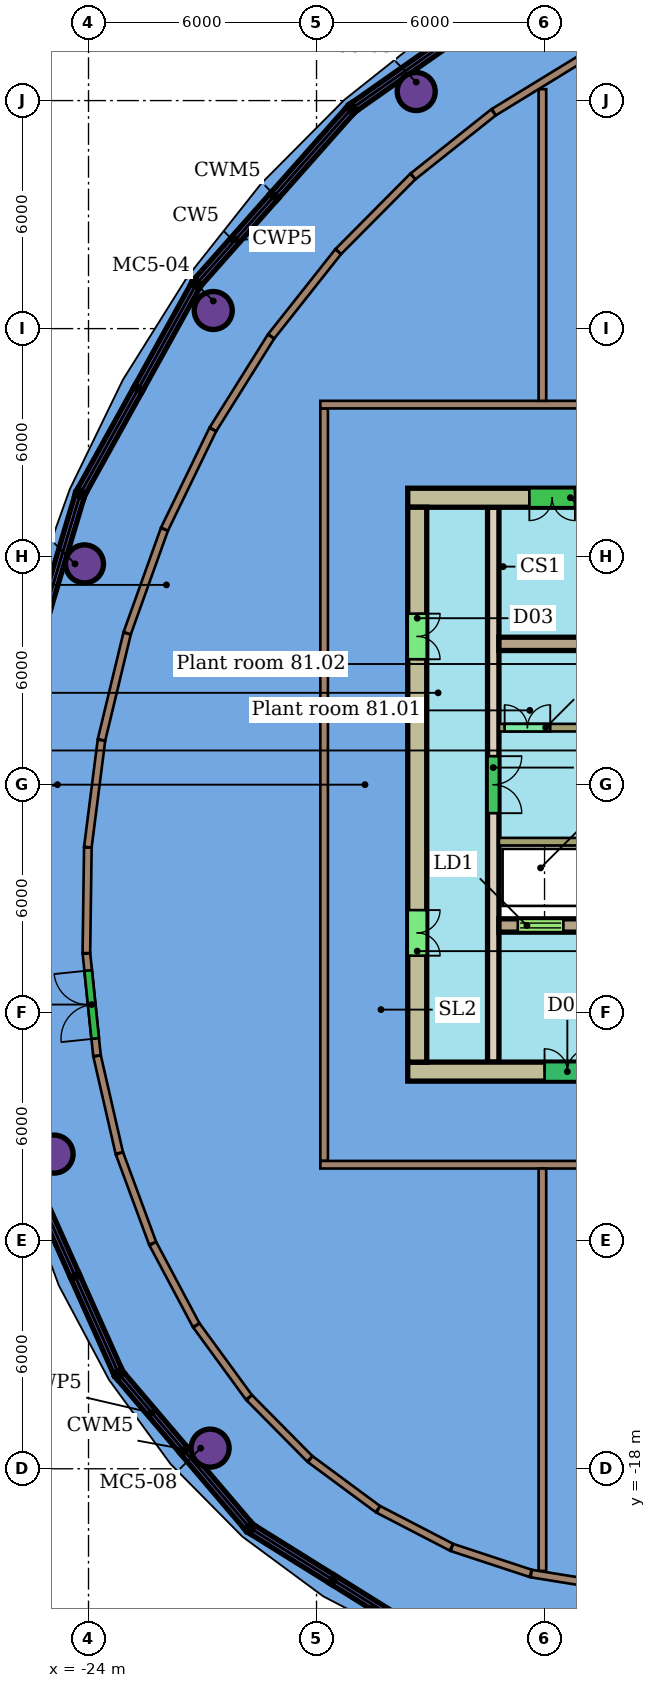
"""IFC4 building model, lengths in metres.
Left out: names, types, materials, properties, quantities, classifications, styles, units other than length and angle.
Written with IfcOpenShell. Run it as: python <this file> out.ifc"""

import sys

from ifc_helpers import new_model, si_unit, direction, frame, frame_2d, origin, origin_2d, place, context, subcontext, project, spatial, rectangle, hollow_circle, extrude, element, fill, save


model = new_model("IFC4")
c1 = context("Model", 3, precision=1e-05, world=origin(), true_north=direction((0.0, 1.0)))
c2 = subcontext(c1, "Body", "Model", "MODEL_VIEW")
j1 = project(units=[si_unit("LENGTHUNIT", "METRE"), si_unit("PLANEANGLEUNIT", "RADIAN")], contexts=[c1])
p1 = place(None, origin())
s1 = spatial("IfcSite", under=j1, at=p1, CompositionType="ELEMENT")
p2 = place(p1, origin())
s2 = spatial("IfcBuilding", under=s1, at=p2, CompositionType="ELEMENT")
p3 = place(p2, frame((0.0, 0.0, 325.5)))
s3 = spatial("IfcBuildingStorey", under=s2, at=p3, CompositionType="ELEMENT", Elevation=325.5)
for number, where, z_axis, x_axis in (
    (1, (-15.377, 18.238, 0.0), (0.0, 0.0, 1.0), (1.0, 0.0, 0.0)),
    (2, (-20.718, 12.477, 0.0), (0.0, 0.0, 1.0), (1.0, 0.0, 0.0)),
    (3, (-24.106, 5.81, 0.0), (0.0, 0.0, 1.0), (1.0, 0.0, 0.0)),
    (4, (-24.906, -9.72, 0.0), (0.0, 0.0, 1.0), (1.0, 0.0, 0.0)),
    (5, (-20.8, -17.457, 0.0), (0.0, 0.0, 1.0), (1.0, 0.0, 0.0)),
):
    element("IfcColumn", number, at=place(p3, frame(where, z_axis=z_axis, x_axis=x_axis)), inside=s3, PredefinedType="COLUMN", context=c2, shape_type="SweptSolid", body=[
        extrude(hollow_circle(Radius=0.5, WallThickness=0.04, at=origin_2d()), origin(), (0.0, 0.0, 1.0), 3.75),
    ])
p4 = place(p3, frame((-17.8, -9.9, 0.0), z_axis=(0.0, 0.0, 1.0), x_axis=(0.0, 1.0, 0.0)))
e6 = element("IfcWall", 6, at=p4, inside=s3, PredefinedType="PARTITIONING", context=c2, shape_type="SweptSolid", body=[
    extrude(rectangle(XDim=19.8, YDim=0.2, at=frame_2d((9.9, 0.0))), origin(), (0.0, 0.0, 1.0), 3.25),
])
p5 = place(p3, frame((-17.9, 10.0, 0.0), z_axis=(0.0, 0.0, 1.0), x_axis=(1.0, 0.0, 0.0)))
e7 = element("IfcWall", 7, at=p5, inside=s3, PredefinedType="PARTITIONING", context=c2, shape_type="SweptSolid", body=[
    extrude(rectangle(XDim=28.976, YDim=0.2, at=frame_2d((14.488, 0.0))), origin(), (0.0, 0.0, 1.0), 3.25),
])
p6 = place(p3, frame((-17.9, -10.0, 0.0), z_axis=(0.0, 0.0, 1.0), x_axis=(1.0, 0.0, 0.0)))
e8 = element("IfcWall", 8, at=p6, inside=s3, PredefinedType="PARTITIONING", context=c2, shape_type="SweptSolid", body=[
    extrude(rectangle(XDim=21.6, YDim=0.2, at=frame_2d((10.8, 0.0))), origin(), (0.0, 0.0, 1.0), 3.25),
])
p7 = place(p3, frame((-12.056, -20.687, 0.0), z_axis=(0.0, 0.0, 1.0), x_axis=(0.0, 1.0, 0.0)))
e9 = element("IfcWall", 9, at=p7, inside=s3, PredefinedType="PARTITIONING", context=c2, shape_type="SweptSolid", body=[
    extrude(rectangle(XDim=10.587, YDim=0.2, at=frame_2d((5.293, 0.0))), origin(), (0.0, 0.0, 1.0), 3.25),
])
p8 = place(p3, frame((-12.056, 10.1, 0.0), z_axis=(0.0, 0.0, 1.0), x_axis=(0.0, 1.0, 0.0)))
e10 = element("IfcWall", 10, at=p8, inside=s3, PredefinedType="PARTITIONING", context=c2, shape_type="SweptSolid", body=[
    extrude(rectangle(XDim=8.2, YDim=0.2, at=frame_2d((4.1, 0.0))), origin(), (0.0, 0.0, 1.0), 3.25),
])
p9 = place(p3, frame((-12.35, -20.757, 0.0), z_axis=(0.0, 0.0, 1.0), x_axis=(0.987257926423, -0.159128208423, 0.0)))
e11 = element("IfcWall", 11, at=p9, inside=s3, PredefinedType="PARTITIONING", context=c2, shape_type="SweptSolid", body=[
    extrude(rectangle(XDim=2.209, YDim=0.2, at=frame_2d((1.104, 0.0))), origin(), (0.0, 0.0, 1.0), 3.25),
])
p10 = place(p3, frame((-14.437, -20.07, 0.0), z_axis=(0.0, 0.0, 1.0), x_axis=(0.949852302688, -0.312698901627, 0.0)))
e12 = element("IfcWall", 12, at=p10, inside=s3, PredefinedType="PARTITIONING", context=c2, shape_type="SweptSolid", body=[
    extrude(rectangle(XDim=2.181, YDim=0.2, at=frame_2d((1.09, 0.0))), origin(), (0.0, 0.0, 1.0), 3.25),
])
p11 = place(p3, frame((-16.373, -19.068, 0.0), z_axis=(0.0, 0.0, 1.0), x_axis=(0.888068415533, -0.45971131086, 0.0)))
e13 = element("IfcWall", 13, at=p11, inside=s3, PredefinedType="PARTITIONING", context=c2, shape_type="SweptSolid", body=[
    extrude(rectangle(XDim=2.165, YDim=0.2, at=frame_2d((1.082, 0.0))), origin(), (0.0, 0.0, 1.0), 3.25),
])
p12 = place(p3, frame((-18.165, -17.748, 0.0), z_axis=(0.0, 0.0, 1.0), x_axis=(0.80443326696, -0.594043027909, 0.0)))
e14 = element("IfcWall", 14, at=p12, inside=s3, PredefinedType="PARTITIONING", context=c2, shape_type="SweptSolid", body=[
    extrude(rectangle(XDim=2.209, YDim=0.2, at=frame_2d((1.105, 0.0))), origin(), (0.0, 0.0, 1.0), 3.25),
])
p13 = place(p3, frame((-19.77, -16.129, 0.0), z_axis=(0.0, 0.0, 1.0), x_axis=(0.703376280453, -0.710817703843, 0.0)))
e15 = element("IfcWall", 15, at=p13, inside=s3, PredefinedType="PARTITIONING", context=c2, shape_type="SweptSolid", body=[
    extrude(rectangle(XDim=2.264, YDim=0.2, at=frame_2d((1.132, 0.0))), origin(), (0.0, 0.0, 1.0), 3.25),
])
p14 = place(p3, frame((-21.16, -14.231, 0.0), z_axis=(0.0, 0.0, 1.0), x_axis=(0.590082027637, -0.807343297897, 0.0)))
e16 = element("IfcWall", 16, at=p14, inside=s3, PredefinedType="PARTITIONING", context=c2, shape_type="SweptSolid", body=[
    extrude(rectangle(XDim=2.338, YDim=0.2, at=frame_2d((1.169, 0.0))), origin(), (0.0, 0.0, 1.0), 3.25),
])
p15 = place(p3, frame((-22.308, -12.077, 0.0), z_axis=(0.0, 0.0, 1.0), x_axis=(0.469611304199, -0.882873276846, 0.0)))
e17 = element("IfcWall", 17, at=p15, inside=s3, PredefinedType="PARTITIONING", context=c2, shape_type="SweptSolid", body=[
    extrude(rectangle(XDim=2.426, YDim=0.2, at=frame_2d((1.213, 0.0))), origin(), (0.0, 0.0, 1.0), 3.25),
])
p16 = place(p3, frame((-23.187, -9.701, 0.0), z_axis=(0.0, 0.0, 1.0), x_axis=(0.34620358582, -0.938159409251, 0.0)))
e18 = element("IfcWall", 18, at=p16, inside=s3, PredefinedType="PARTITIONING", context=c2, shape_type="SweptSolid", body=[
    extrude(rectangle(XDim=2.52, YDim=0.2, at=frame_2d((1.26, 0.0))), origin(), (0.0, 0.0, 1.0), 3.25),
])
p17 = place(p3, frame((-23.775, -7.141, 0.0), z_axis=(0.0, 0.0, 1.0), x_axis=(0.223324390074, -0.974744180182, 0.0)))
e19 = element("IfcWall", 19, at=p17, inside=s3, PredefinedType="PARTITIONING", context=c2, shape_type="SweptSolid", body=[
    extrude(rectangle(XDim=2.614, YDim=0.2, at=frame_2d((1.307, 0.0))), origin(), (0.0, 0.0, 1.0), 3.25),
])
p18 = place(p3, frame((-23.777, -7.129, 0.0), z_axis=(0.0, 0.0, 1.0), x_axis=(-0.102877560919, 0.994694027055, 0.0)))
e20 = element("IfcWall", 20, at=p18, inside=s3, PredefinedType="PARTITIONING", context=c2, shape_type="SweptSolid", body=[
    extrude(rectangle(XDim=2.701, YDim=0.2, at=frame_2d((1.35, 0.0))), origin(), (0.0, 0.0, 1.0), 3.25),
])
p19 = place(p18, frame((0.45, 0.0, 0.0)))
e21 = element("IfcOpeningElement", 21, at=p19, cuts=e20, PredefinedType="OPENING", context=c2, shape_type="SweptSolid", body=[
    extrude(rectangle(XDim=1.8, YDim=2.4, at=frame_2d((0.9, 1.2))), frame((0.0, 0.11, 0.0), z_axis=(0.0, -1.0, 0.0), x_axis=(1.0, 0.0, 0.0)), (0.0, 0.0, 1.0), 0.22),
])
p20 = place(p3, frame((-24.056, -4.431, 0.0), z_axis=(0.0, 0.0, 1.0), x_axis=(0.013897320686, 0.999903427576, 0.0)))
e22 = element("IfcWall", 22, at=p20, inside=s3, PredefinedType="PARTITIONING", context=c2, shape_type="SweptSolid", body=[
    extrude(rectangle(XDim=2.776, YDim=0.2, at=frame_2d((1.388, 0.0))), origin(), (0.0, 0.0, 1.0), 3.25),
])
p21 = place(p3, frame((-24.018, -1.644, 0.0), z_axis=(0.0, 0.0, 1.0), x_axis=(0.126302032537, 0.991991832919, 0.0)))
e23 = element("IfcWall", 23, at=p21, inside=s3, PredefinedType="PARTITIONING", context=c2, shape_type="SweptSolid", body=[
    extrude(rectangle(XDim=2.836, YDim=0.2, at=frame_2d((1.418, 0.0))), origin(), (0.0, 0.0, 1.0), 3.25),
])
p22 = place(p3, frame((-23.658, 1.18, 0.0), z_axis=(0.0, 0.0, 1.0), x_axis=(0.234120678443, 0.972207543648, 0.0)))
e24 = element("IfcWall", 24, at=p22, inside=s3, PredefinedType="PARTITIONING", context=c2, shape_type="SweptSolid", body=[
    extrude(rectangle(XDim=2.877, YDim=0.2, at=frame_2d((1.438, 0.0))), origin(), (0.0, 0.0, 1.0), 3.25),
])
p23 = place(p3, frame((-22.982, 3.988, 0.0), z_axis=(0.0, 0.0, 1.0), x_axis=(0.337478197562, 0.941333344873, 0.0)))
e25 = element("IfcWall", 25, at=p23, inside=s3, PredefinedType="PARTITIONING", context=c2, shape_type="SweptSolid", body=[
    extrude(rectangle(XDim=2.898, YDim=0.2, at=frame_2d((1.449, 0.0))), origin(), (0.0, 0.0, 1.0), 3.25),
])
p24 = place(p3, frame((-22.0, 6.726, 0.0), z_axis=(0.0, 0.0, 1.0), x_axis=(0.436405284506, 0.89975020292, 0.0)))
e26 = element("IfcWall", 26, at=p24, inside=s3, PredefinedType="PARTITIONING", context=c2, shape_type="SweptSolid", body=[
    extrude(rectangle(XDim=2.909, YDim=0.2, at=frame_2d((1.455, 0.0))), origin(), (0.0, 0.0, 1.0), 3.25),
])
p25 = place(p3, frame((-20.725, 9.352, 0.0), z_axis=(0.0, 0.0, 1.0), x_axis=(0.530761457751, 0.847521253401, 0.0)))
e27 = element("IfcWall", 27, at=p25, inside=s3, PredefinedType="PARTITIONING", context=c2, shape_type="SweptSolid", body=[
    extrude(rectangle(XDim=2.877, YDim=0.2, at=frame_2d((1.438, 0.0))), origin(), (0.0, 0.0, 1.0), 3.25),
])
p26 = place(p3, frame((-19.191, 11.799, 0.0), z_axis=(0.0, 0.0, 1.0), x_axis=(0.620327979869, 0.784342525553, 0.0)))
e28 = element("IfcWall", 28, at=p26, inside=s3, PredefinedType="PARTITIONING", context=c2, shape_type="SweptSolid", body=[
    extrude(rectangle(XDim=2.836, YDim=0.2, at=frame_2d((1.418, 0.0))), origin(), (0.0, 0.0, 1.0), 3.25),
])
p27 = place(p3, frame((-17.424, 14.031, 0.0), z_axis=(0.0, 0.0, 1.0), x_axis=(0.704683921548, 0.70952136734, 0.0)))
e29 = element("IfcWall", 29, at=p27, inside=s3, PredefinedType="PARTITIONING", context=c2, shape_type="SweptSolid", body=[
    extrude(rectangle(XDim=2.776, YDim=0.2, at=frame_2d((1.388, 0.0))), origin(), (0.0, 0.0, 1.0), 3.25),
])
p28 = place(p3, frame((-15.458, 16.008, 0.0), z_axis=(0.0, 0.0, 1.0), x_axis=(0.782656107767, 0.62245434931, 0.0)))
e30 = element("IfcWall", 30, at=p28, inside=s3, PredefinedType="PARTITIONING", context=c2, shape_type="SweptSolid", body=[
    extrude(rectangle(XDim=2.7, YDim=0.2, at=frame_2d((1.35, 0.0))), origin(), (0.0, 0.0, 1.0), 3.25),
])
p29 = place(p3, frame((-13.334, 17.696, 0.0), z_axis=(0.0, 0.0, 1.0), x_axis=(0.852667029926, 0.522454721557, 0.0)))
e31 = element("IfcWall", 31, at=p29, inside=s3, PredefinedType="PARTITIONING", context=c2, shape_type="SweptSolid", body=[
    extrude(rectangle(XDim=2.614, YDim=0.2, at=frame_2d((1.307, 0.0))), origin(), (0.0, 0.0, 1.0), 3.25),
])
p30 = place(p3, frame((-6.0, 7.55, 0.0), z_axis=(0.0, 0.0, 1.0), x_axis=(-1.0, 0.0, 0.0)))
e32 = element("IfcWall", 32, at=p30, inside=s3, PredefinedType="SHEAR", context=c2, shape_type="SweptSolid", body=[
    extrude(rectangle(XDim=9.6, YDim=0.5, at=frame_2d((4.8, 0.0))), origin(), (0.0, 0.0, 1.0), 3.75),
])
p31 = place(p30, frame((5.2, 0.0, 0.0)))
e33 = element("IfcOpeningElement", 33, at=p31, cuts=e32, PredefinedType="OPENING", context=c2, shape_type="SweptSolid", body=[
    extrude(rectangle(XDim=1.2, YDim=2.1, at=frame_2d((0.6, 1.05))), frame((0.0, 0.26, 0.0), z_axis=(0.0, -1.0, 0.0), x_axis=(1.0, 0.0, 0.0)), (0.0, 0.0, 1.0), 0.52),
])
p32 = place(p3, frame((-15.6, -7.55, 0.0), z_axis=(0.0, 0.0, 1.0), x_axis=(1.0, 0.0, 0.0)))
e34 = element("IfcWall", 34, at=p32, inside=s3, PredefinedType="SHEAR", context=c2, shape_type="SweptSolid", body=[
    extrude(rectangle(XDim=19.2, YDim=0.5, at=frame_2d((9.6, 0.0))), origin(), (0.0, 0.0, 1.0), 3.75),
])
p33 = place(p32, frame((3.6, 0.0, 0.0)))
e35 = element("IfcOpeningElement", 35, at=p33, cuts=e34, PredefinedType="OPENING", context=c2, shape_type="SweptSolid", body=[
    extrude(rectangle(XDim=1.2, YDim=2.1, at=frame_2d((0.6, 1.05))), frame((0.0, 0.26, 0.0), z_axis=(0.0, -1.0, 0.0), x_axis=(1.0, 0.0, 0.0)), (0.0, 0.0, 1.0), 0.52),
])
p34 = place(p3, frame((-15.35, 7.3, 0.0), z_axis=(0.0, 0.0, 1.0), x_axis=(0.0, -1.0, 0.0)))
e36 = element("IfcWall", 36, at=p34, inside=s3, PredefinedType="SHEAR", context=c2, shape_type="SweptSolid", body=[
    extrude(rectangle(XDim=14.6, YDim=0.5, at=frame_2d((7.3, 0.0))), origin(), (0.0, 0.0, 1.0), 3.75),
])
p35 = place(p34, frame((10.6, 0.0, 0.0)))
e37 = element("IfcOpeningElement", 37, at=p35, cuts=e36, PredefinedType="OPENING", context=c2, shape_type="SweptSolid", body=[
    extrude(rectangle(XDim=1.2, YDim=2.1, at=frame_2d((0.6, 1.05))), frame((0.0, 0.26, 0.0), z_axis=(0.0, -1.0, 0.0), x_axis=(1.0, 0.0, 0.0)), (0.0, 0.0, 1.0), 0.52),
])
p36 = place(p34, frame((2.8, 0.0, 0.0)))
e38 = element("IfcOpeningElement", 38, at=p36, cuts=e36, PredefinedType="OPENING", context=c2, shape_type="SweptSolid", body=[
    extrude(rectangle(XDim=1.2, YDim=2.1, at=frame_2d((0.6, 1.05))), frame((0.0, 0.26, 0.0), z_axis=(0.0, -1.0, 0.0), x_axis=(1.0, 0.0, 0.0)), (0.0, 0.0, 1.0), 0.52),
])
p37 = place(p3, frame((-13.2, 3.705, 0.0), z_axis=(0.0, 0.0, 1.0), x_axis=(1.0, 0.0, 0.0)))
e39 = element("IfcWall", 39, at=p37, inside=s3, PredefinedType="SHEAR", context=c2, shape_type="SweptSolid", body=[
    extrude(rectangle(XDim=7.2, YDim=0.35, at=frame_2d((3.6, 0.0))), origin(), (0.0, 0.0, 1.0), 3.75),
])
p38 = place(p3, frame((-13.2, -3.705, 0.0), z_axis=(0.0, 0.0, 1.0), x_axis=(1.0, 0.0, 0.0)))
e40 = element("IfcWall", 40, at=p38, inside=s3, PredefinedType="SHEAR", context=c2, shape_type="SweptSolid", body=[
    extrude(rectangle(XDim=7.2, YDim=0.35, at=frame_2d((3.6, 0.0))), origin(), (0.0, 0.0, 1.0), 3.75),
])
p39 = place(p38, frame((0.496, 0.0, 0.0)))
e41 = element("IfcOpeningElement", 41, at=p39, cuts=e40, PredefinedType="OPENING", context=c2, shape_type="SweptSolid", body=[
    extrude(rectangle(XDim=1.2, YDim=2.1, at=frame_2d((0.6, 1.05))), frame((0.0, 0.185, 0.0), z_axis=(0.0, -1.0, 0.0), x_axis=(1.0, 0.0, 0.0)), (0.0, 0.0, 1.0), 0.37),
])
p40 = place(p38, frame((2.938, 0.0, 0.0)))
e42 = element("IfcOpeningElement", 42, at=p40, cuts=e40, PredefinedType="OPENING", context=c2, shape_type="SweptSolid", body=[
    extrude(rectangle(XDim=1.2, YDim=2.1, at=frame_2d((0.6, 1.05))), frame((0.0, 0.185, 0.0), z_axis=(0.0, -1.0, 0.0), x_axis=(1.0, 0.0, 0.0)), (0.0, 0.0, 1.0), 0.37),
])
p41 = place(p3, frame((-13.35, 7.3, 0.0), z_axis=(0.0, 0.0, 1.0), x_axis=(0.0, -1.0, 0.0)))
e43 = element("IfcWall", 43, at=p41, inside=s3, PredefinedType="SHEAR", context=c2, shape_type="SweptSolid", body=[
    extrude(rectangle(XDim=14.6, YDim=0.3, at=frame_2d((7.3, 0.0))), origin(), (0.0, 0.0, 1.0), 3.75),
])
p42 = place(p41, frame((6.55, 0.0, 0.0)))
e44 = element("IfcOpeningElement", 44, at=p42, cuts=e43, PredefinedType="OPENING", context=c2, shape_type="SweptSolid", body=[
    extrude(rectangle(XDim=1.5, YDim=2.1, at=frame_2d((0.75, 1.05))), frame((0.0, 0.16, 0.0), z_axis=(0.0, -1.0, 0.0), x_axis=(1.0, 0.0, 0.0)), (0.0, 0.0, 1.0), 0.32),
])
p43 = place(p3, frame((-13.2, 1.5, 0.0), z_axis=(0.0, 0.0, 1.0), x_axis=(1.0, 0.0, 0.0)))
e45 = element("IfcWall", 45, at=p43, inside=s3, PredefinedType="SHEAR", context=c2, shape_type="SweptSolid", body=[
    extrude(rectangle(XDim=14.4, YDim=0.2, at=frame_2d((7.2, 0.0))), origin(), (0.0, 0.0, 1.0), 3.75),
])
p44 = place(p43, frame((0.15, 0.0, 0.0)))
e46 = element("IfcOpeningElement", 46, at=p44, cuts=e45, PredefinedType="OPENING", context=c2, shape_type="SweptSolid", body=[
    extrude(rectangle(XDim=1.2, YDim=2.4, at=frame_2d((0.6, 1.2))), frame((0.0, 0.11, 0.0), z_axis=(0.0, -1.0, 0.0), x_axis=(1.0, 0.0, 0.0)), (0.0, 0.0, 1.0), 0.22),
])
p45 = place(p43, frame((4.977, 0.0, 0.0)))
e47 = element("IfcOpeningElement", 47, at=p45, cuts=e45, PredefinedType="OPENING", context=c2, shape_type="SweptSolid", body=[
    extrude(rectangle(XDim=1.2, YDim=2.4, at=frame_2d((0.6, 1.2))), frame((0.0, 0.11, 0.0), z_axis=(0.0, -1.0, 0.0), x_axis=(1.0, 0.0, 0.0)), (0.0, 0.0, 1.0), 0.22),
])
p46 = place(p43, frame((13.05, 0.0, 0.0)))
e48 = element("IfcOpeningElement", 48, at=p46, cuts=e45, PredefinedType="OPENING", context=c2, shape_type="SweptSolid", body=[
    extrude(rectangle(XDim=1.2, YDim=2.4, at=frame_2d((0.6, 1.2))), frame((0.0, 0.11, 0.0), z_axis=(0.0, -1.0, 0.0), x_axis=(1.0, 0.0, 0.0)), (0.0, 0.0, 1.0), 0.22),
])
p47 = place(p3, frame((1.2, -1.5, 0.0), z_axis=(0.0, 0.0, 1.0), x_axis=(-1.0, 0.0, 0.0)))
e49 = element("IfcWall", 49, at=p47, inside=s3, PredefinedType="SHEAR", context=c2, shape_type="SweptSolid", body=[
    extrude(rectangle(XDim=14.4, YDim=0.2, at=frame_2d((7.2, 0.0))), origin(), (0.0, 0.0, 1.0), 3.75),
])
p48 = place(p47, frame((7.821, 0.0, 0.0)))
e50 = element("IfcOpeningElement", 50, at=p48, cuts=e49, PredefinedType="OPENING", context=c2, shape_type="SweptSolid", body=[
    extrude(rectangle(XDim=1.2, YDim=2.1, at=frame_2d((0.6, 1.05))), frame((0.0, 0.11, 0.0), z_axis=(0.0, -1.0, 0.0), x_axis=(1.0, 0.0, 0.0)), (0.0, 0.0, 1.0), 0.22),
])
p49 = place(p47, frame((4.895, 0.0, 0.0)))
e51 = element("IfcOpeningElement", 51, at=p49, cuts=e49, PredefinedType="OPENING", context=c2, shape_type="SweptSolid", body=[
    extrude(rectangle(XDim=1.2, YDim=2.4, at=frame_2d((0.6, 1.2))), frame((0.0, 0.11, 0.0), z_axis=(0.0, -1.0, 0.0), x_axis=(1.0, 0.0, 0.0)), (0.0, 0.0, 1.0), 0.22),
])
p50 = place(p47, frame((2.56, 0.0, 0.0)))
e52 = element("IfcOpeningElement", 52, at=p50, cuts=e49, PredefinedType="OPENING", context=c2, shape_type="SweptSolid", body=[
    extrude(rectangle(XDim=1.2, YDim=2.4, at=frame_2d((0.6, 1.2))), frame((0.0, 0.11, 0.0), z_axis=(0.0, -1.0, 0.0), x_axis=(1.0, 0.0, 0.0)), (0.0, 0.0, 1.0), 0.22),
])
p51 = place(p47, frame((0.15, 0.0, 0.0)))
e53 = element("IfcOpeningElement", 53, at=p51, cuts=e49, PredefinedType="OPENING", context=c2, shape_type="SweptSolid", body=[
    extrude(rectangle(XDim=1.2, YDim=2.4, at=frame_2d((0.6, 1.2))), frame((0.0, 0.11, 0.0), z_axis=(0.0, -1.0, 0.0), x_axis=(1.0, 0.0, 0.0)), (0.0, 0.0, 1.0), 0.22),
])
p52 = place(p19, origin())
e54 = element("IfcDoor", 54, at=p52, inside=s3, OperationType="DOUBLE_DOOR_SINGLE_SWING", PredefinedType="DOOR", context=c2, shape_type="SweptSolid", body=[
    extrude(rectangle(XDim=1.8, YDim=2.4, at=frame_2d((0.9, 1.2))), frame((0.0, 0.025, 0.0), z_axis=(0.0, -1.0, 0.0), x_axis=(1.0, 0.0, 0.0)), (0.0, 0.0, 1.0), 0.05),
])
fill(e21, e54)
p53 = place(p31, origin())
e55 = element("IfcDoor", 55, at=p53, inside=s3, OperationType="DOUBLE_DOOR_SINGLE_SWING", PredefinedType="NOTDEFINED", context=c2, shape_type="SweptSolid", body=[
    extrude(rectangle(XDim=1.2, YDim=2.1, at=frame_2d((0.6, 1.05))), frame((0.0, 0.025, 0.0), z_axis=(0.0, -1.0, 0.0), x_axis=(1.0, 0.0, 0.0)), (0.0, 0.0, 1.0), 0.05),
])
fill(e33, e55)
p54 = place(p33, origin())
e56 = element("IfcDoor", 56, at=p54, inside=s3, OperationType="DOUBLE_DOOR_SINGLE_SWING", PredefinedType="NOTDEFINED", context=c2, shape_type="SweptSolid", body=[
    extrude(rectangle(XDim=1.2, YDim=2.1, at=frame_2d((0.6, 1.05))), frame((0.0, 0.025, 0.0), z_axis=(0.0, -1.0, 0.0), x_axis=(1.0, 0.0, 0.0)), (0.0, 0.0, 1.0), 0.05),
])
fill(e35, e56)
p55 = place(p35, origin())
e57 = element("IfcDoor", 57, at=p55, inside=s3, OperationType="DOUBLE_DOOR_SINGLE_SWING", PredefinedType="NOTDEFINED", context=c2, shape_type="SweptSolid", body=[
    extrude(rectangle(XDim=1.2, YDim=2.1, at=frame_2d((0.6, 1.05))), frame((0.0, 0.025, 0.0), z_axis=(0.0, -1.0, 0.0), x_axis=(1.0, 0.0, 0.0)), (0.0, 0.0, 1.0), 0.05),
])
fill(e37, e57)
p56 = place(p36, origin())
e58 = element("IfcDoor", 58, at=p56, inside=s3, OperationType="DOUBLE_DOOR_SINGLE_SWING", PredefinedType="NOTDEFINED", context=c2, shape_type="SweptSolid", body=[
    extrude(rectangle(XDim=1.2, YDim=2.1, at=frame_2d((0.6, 1.05))), frame((0.0, 0.025, 0.0), z_axis=(0.0, -1.0, 0.0), x_axis=(1.0, 0.0, 0.0)), (0.0, 0.0, 1.0), 0.05),
])
fill(e38, e58)
p57 = place(p39, origin())
e59 = element("IfcDoor", 59, at=p57, inside=s3, OperationType="DOUBLE_DOOR_SLIDING", PredefinedType="NOTDEFINED", context=c2, shape_type="SweptSolid", body=[
    extrude(rectangle(XDim=1.2, YDim=2.1, at=frame_2d((0.6, 1.05))), frame((0.0, 0.025, 0.0), z_axis=(0.0, -1.0, 0.0), x_axis=(1.0, 0.0, 0.0)), (0.0, 0.0, 1.0), 0.05),
])
fill(e41, e59)
p58 = place(p42, origin())
e60 = element("IfcDoor", 60, at=p58, inside=s3, OperationType="DOUBLE_DOOR_SINGLE_SWING", PredefinedType="NOTDEFINED", context=c2, shape_type="SweptSolid", body=[
    extrude(rectangle(XDim=1.5, YDim=2.1, at=frame_2d((0.75, 1.05))), frame((0.0, 0.025, 0.0), z_axis=(0.0, -1.0, 0.0), x_axis=(1.0, 0.0, 0.0)), (0.0, 0.0, 1.0), 0.05),
])
fill(e44, e60)
p59 = place(p44, origin())
e61 = element("IfcDoor", 61, at=p59, inside=s3, OperationType="DOUBLE_DOOR_SINGLE_SWING", PredefinedType="NOTDEFINED", context=c2, shape_type="SweptSolid", body=[
    extrude(rectangle(XDim=1.2, YDim=2.4, at=frame_2d((0.6, 1.2))), frame((0.0, 0.025, 0.0), z_axis=(0.0, -1.0, 0.0), x_axis=(1.0, 0.0, 0.0)), (0.0, 0.0, 1.0), 0.05),
])
fill(e46, e61)
save(model, sys.argv[1])
